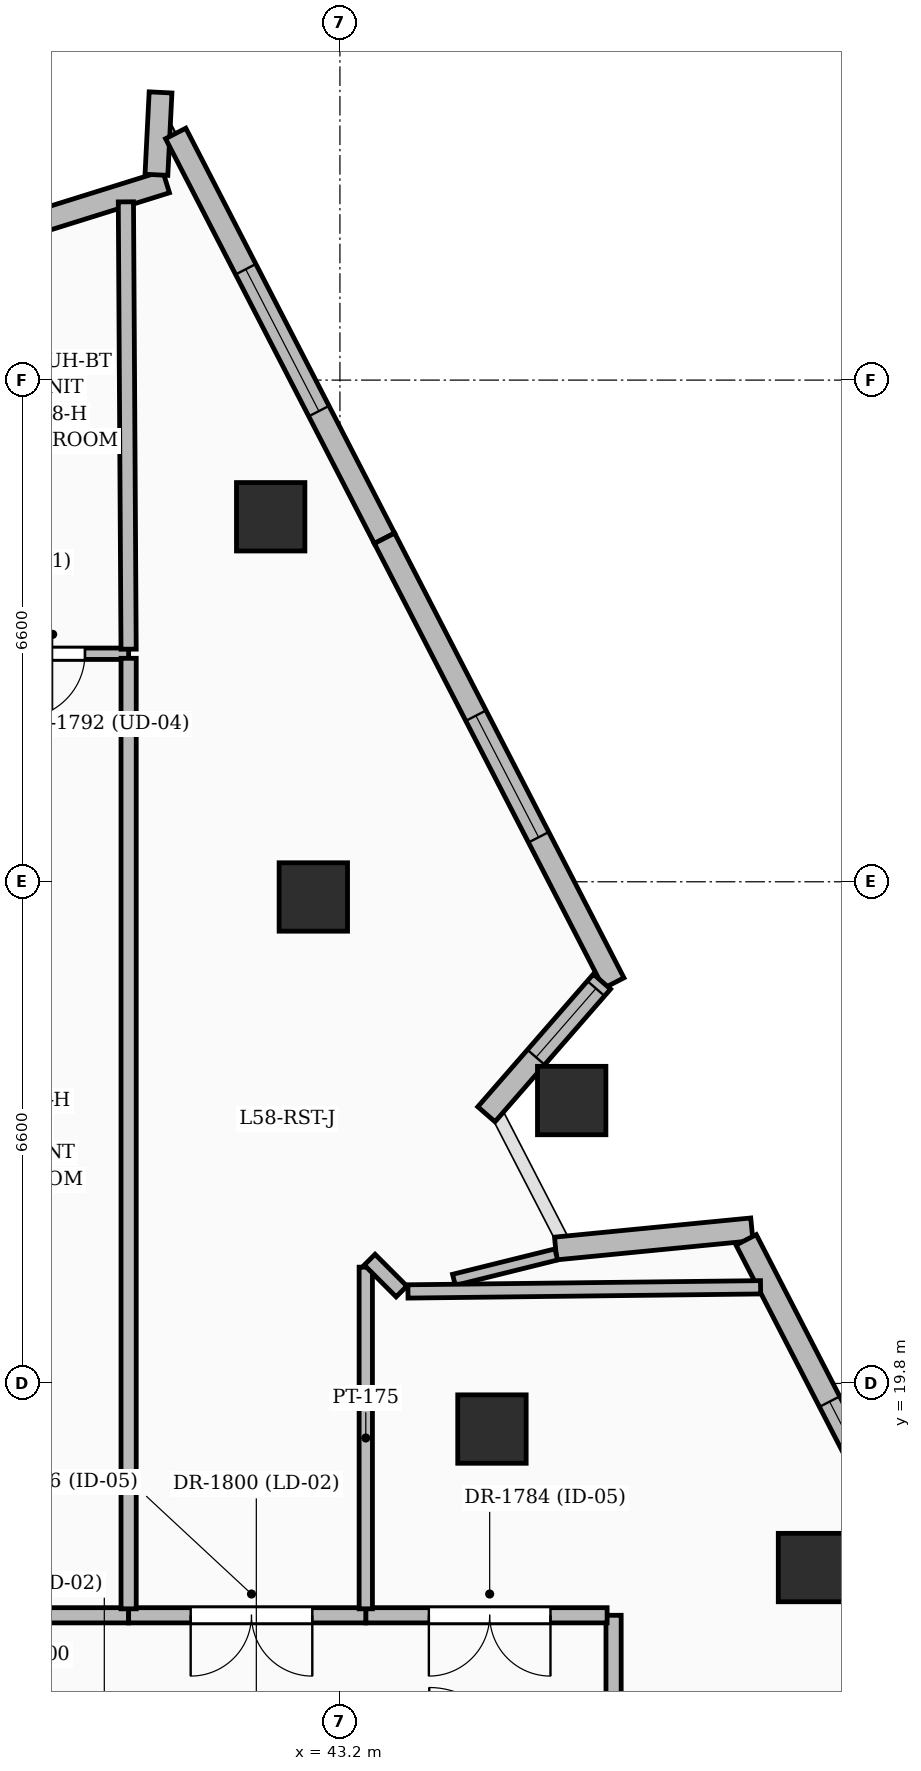
"""IFC4 building model, lengths in metres.
Left out: names, types, materials, properties, quantities, classifications, styles, units other than length and angle.
Written with IfcOpenShell. Run it as: python <this file> out.ifc"""

import sys

from ifc_helpers import new_model, si_unit, direction, frame, frame_2d, origin, origin_2d, place, context, subcontext, project, spatial, rectangle, extrude, element, fill, save


model = new_model("IFC4")
c1 = context("Model", 3, precision=1e-05, world=origin(), true_north=direction((0.0, 1.0)))
c2 = subcontext(c1, "Body", "Model", "MODEL_VIEW")
j1 = project(units=[si_unit("LENGTHUNIT", "METRE"), si_unit("PLANEANGLEUNIT", "RADIAN")], contexts=[c1])
p1 = place(None, origin())
s1 = spatial("IfcSite", under=j1, at=p1, CompositionType="ELEMENT")
p2 = place(p1, origin())
s2 = spatial("IfcBuilding", under=s1, at=p2, CompositionType="ELEMENT")
p3 = place(p2, frame((0.0, 0.0, 225.75)))
s3 = spatial("IfcBuildingStorey", under=s2, at=p3, CompositionType="ELEMENT", Elevation=225.75)
for number, where, z_axis, x_axis in (
    (1, (45.2, 19.2, 0.0), (0.0, 0.0, 1.0), (1.0, 0.0, 0.0)),
    (2, (42.85, 26.2, 0.0), (0.0, 0.0, 1.0), (1.0, 0.0, 0.0)),
    (3, (49.417, 17.378, 0.0), (0.0, 0.0, 1.0), (1.0, 0.0, 0.0)),
    (4, (46.249, 23.522, 0.0), (0.0, 0.0, 1.0), (1.0, 0.0, 0.0)),
    (5, (42.289, 31.202, 0.0), (0.0, 0.0, 1.0), (1.0, 0.0, 0.0)),
):
    element("IfcColumn", number, at=place(p3, frame(where, z_axis=z_axis, x_axis=x_axis)), inside=s3, PredefinedType="COLUMN", context=c2, shape_type="SweptSolid", body=[
        extrude(rectangle(XDim=0.9, YDim=0.9, at=origin_2d()), origin(), (0.0, 0.0, 1.0), 3.75),
    ])
p4 = place(p3, frame((38.886, 34.975, 0.0), z_axis=(0.0, 0.0, 1.0), x_axis=(0.954524975295, 0.298130963736, 0.0)))
e6 = element("IfcWall", 6, at=p4, inside=s3, PredefinedType="SOLIDWALL", context=c2, shape_type="SweptSolid", body=[
    extrude(rectangle(XDim=2.124, YDim=0.3, at=frame_2d((1.062, 0.0))), origin(), (0.0, 0.0, 1.0), 3.5),
])
p5 = place(p3, frame((40.786, 35.701, 0.0), z_axis=(0.0, 0.0, 1.0), x_axis=(0.05016199642, 0.998741094636, 0.0)))
e7 = element("IfcWall", 7, at=p5, inside=s3, PredefinedType="SOLIDWALL", context=c2, shape_type="SweptSolid", body=[
    extrude(rectangle(XDim=1.085, YDim=0.3, at=frame_2d((0.543, 0.0))), origin(), (0.0, 0.0, 1.0), 3.5),
])
p6 = place(p3, frame((41.039, 36.245, 0.0), z_axis=(0.0, 0.0, 1.0), x_axis=(0.458292150172, -0.888801611773, 0.0)))
e8 = element("IfcWall", 8, at=p6, inside=s3, PredefinedType="SOLIDWALL", context=c2, shape_type="SweptSolid", body=[
    extrude(rectangle(XDim=5.993, YDim=0.3, at=frame_2d((2.997, 0.0))), origin(), (0.0, 0.0, 1.0), 3.5),
])
p7 = place(p6, frame((2.01, 0.0, 0.55)))
e9 = element("IfcOpeningElement", 9, at=p7, cuts=e8, PredefinedType="OPENING", context=c2, shape_type="SweptSolid", body=[
    extrude(rectangle(XDim=2.1, YDim=2.4, at=frame_2d((1.05, 1.2))), frame((0.0, 0.16, 0.0), z_axis=(0.0, -1.0, 0.0), x_axis=(1.0, 0.0, 0.0)), (0.0, 0.0, 1.0), 0.32),
])
p8 = place(p3, frame((43.786, 30.918, 0.0), z_axis=(0.0, 0.0, 1.0), x_axis=(0.458349099599, -0.888772244671, 0.0)))
e10 = element("IfcWall", 10, at=p8, inside=s3, PredefinedType="SOLIDWALL", context=c2, shape_type="SweptSolid", body=[
    extrude(rectangle(XDim=6.583, YDim=0.3, at=frame_2d((3.292, 0.0))), origin(), (0.0, 0.0, 1.0), 3.5),
])
p9 = place(p8, frame((2.625, 0.0, 0.6)))
e11 = element("IfcOpeningElement", 11, at=p9, cuts=e10, PredefinedType="OPENING", context=c2, shape_type="SweptSolid", body=[
    extrude(rectangle(XDim=1.8, YDim=2.1, at=frame_2d((0.9, 1.05))), frame((0.0, 0.16, 0.0), z_axis=(0.0, -1.0, 0.0), x_axis=(1.0, 0.0, 0.0)), (0.0, 0.0, 1.0), 0.32),
])
p10 = place(p3, frame((46.647, 25.086, 0.0), z_axis=(0.0, 0.0, 1.0), x_axis=(-0.656860073981, -0.754012495394, 0.0)))
e12 = element("IfcWall", 12, at=p10, inside=s3, PredefinedType="SOLIDWALL", context=c2, shape_type="SweptSolid", body=[
    extrude(rectangle(XDim=2.314, YDim=0.3, at=frame_2d((1.157, 0.0))), origin(), (0.0, 0.0, 1.0), 2.825),
])
p11 = place(p10, frame((0.12, 0.0, 0.8)))
e13 = element("IfcOpeningElement", 13, at=p11, cuts=e12, PredefinedType="OPENING", context=c2, shape_type="SweptSolid", body=[
    extrude(rectangle(XDim=1.2, YDim=1.8, at=frame_2d((0.6, 0.9))), frame((0.0, 0.16, 0.0), z_axis=(0.0, -1.0, 0.0), x_axis=(1.0, 0.0, 0.0)), (0.0, 0.0, 1.0), 0.32),
])
p12 = place(p3, frame((46.038, 21.575, 0.0), z_axis=(0.0, 0.0, 1.0), x_axis=(0.995262869225, 0.097220476965, 0.0)))
e14 = element("IfcWall", 14, at=p12, inside=s3, PredefinedType="SOLIDWALL", context=c2, shape_type="SweptSolid", body=[
    extrude(rectangle(XDim=2.594, YDim=0.3, at=frame_2d((1.297, 0.0))), origin(), (0.0, 0.0, 1.0), 2.3),
])
p13 = place(p3, frame((48.544, 21.689, 0.0), z_axis=(0.0, 0.0, 1.0), x_axis=(0.458305242752, -0.888794860733, 0.0)))
e15 = element("IfcWall", 15, at=p13, inside=s3, PredefinedType="SOLIDWALL", context=c2, shape_type="SweptSolid", body=[
    extrude(rectangle(XDim=5.986, YDim=0.3, at=frame_2d((2.993, 0.0))), origin(), (0.0, 0.0, 1.0), 3.5),
])
p14 = place(p13, frame((2.395, 0.0, 0.8)))
e16 = element("IfcOpeningElement", 16, at=p14, cuts=e15, PredefinedType="OPENING", context=c2, shape_type="SweptSolid", body=[
    extrude(rectangle(XDim=1.2, YDim=1.8, at=frame_2d((0.6, 0.9))), frame((0.0, 0.16, 0.0), z_axis=(0.0, -1.0, 0.0), x_axis=(1.0, 0.0, 0.0)), (0.0, 0.0, 1.0), 0.32),
])
p15 = place(p3, frame((46.8, 15.05, 0.0), z_axis=(0.0, 0.0, 1.0), x_axis=(0.0, 1.0, 0.0)))
e17 = element("IfcWall", 17, at=p15, inside=s3, PredefinedType="PARTITIONING", context=c2, shape_type="SweptSolid", body=[
    extrude(rectangle(XDim=1.7, YDim=0.2, at=frame_2d((0.85, 0.0))), origin(), (0.0, 0.0, 1.0), 2.685),
])
p16 = place(p3, frame((46.715, 16.75, 0.0), z_axis=(0.0, 0.0, 1.0), x_axis=(-1.0, 0.0, 0.0)))
e18 = element("IfcWall", 18, at=p16, inside=s3, PredefinedType="PARTITIONING", context=c2, shape_type="SweptSolid", body=[
    extrude(rectangle(XDim=3.175, YDim=0.2, at=frame_2d((1.587, 0.0))), origin(), (0.0, 0.0, 1.0), 2.685),
])
p17 = place(p16, frame((0.745, 0.0, 0.0)))
e19 = element("IfcOpeningElement", 19, at=p17, cuts=e18, PredefinedType="OPENING", context=c2, shape_type="SweptSolid", body=[
    extrude(rectangle(XDim=1.6, YDim=2.3, at=frame_2d((0.8, 1.15))), frame((0.0, 0.11, 0.0), z_axis=(0.0, -1.0, 0.0), x_axis=(1.0, 0.0, 0.0)), (0.0, 0.0, 1.0), 0.22),
])
p18 = place(p3, frame((40.42, 16.75, 0.0), z_axis=(0.0, 0.0, 1.0), x_axis=(-1.0, 0.0, 0.0)))
e20 = element("IfcWall", 20, at=p18, inside=s3, PredefinedType="PARTITIONING", context=c2, shape_type="SweptSolid", body=[
    extrude(rectangle(XDim=3.12, YDim=0.2, at=frame_2d((1.56, 0.0))), origin(), (0.0, 0.0, 1.0), 3.5),
])
p19 = place(p3, frame((43.54, 16.75, 0.0), z_axis=(0.0, 0.0, 1.0), x_axis=(-1.0, 0.0, 0.0)))
e21 = element("IfcWall", 21, at=p19, inside=s3, PredefinedType="PARTITIONING", context=c2, shape_type="SweptSolid", body=[
    extrude(rectangle(XDim=3.12, YDim=0.2, at=frame_2d((1.56, 0.0))), origin(), (0.0, 0.0, 1.0), 3.5),
])
p20 = place(p19, frame((0.704, 0.0, 0.0)))
e22 = element("IfcOpeningElement", 22, at=p20, cuts=e21, PredefinedType="OPENING", context=c2, shape_type="SweptSolid", body=[
    extrude(rectangle(XDim=1.6, YDim=2.3, at=frame_2d((0.8, 1.15))), frame((0.0, 0.11, 0.0), z_axis=(0.0, -1.0, 0.0), x_axis=(1.0, 0.0, 0.0)), (0.0, 0.0, 1.0), 0.22),
])
p21 = place(p3, frame((43.54, 21.33, 0.0), z_axis=(0.0, 0.0, 1.0), x_axis=(0.0, -1.0, 0.0)))
e23 = element("IfcWall", 23, at=p21, inside=s3, PredefinedType="PARTITIONING", context=c2, shape_type="SweptSolid", body=[
    extrude(rectangle(XDim=4.495, YDim=0.175, at=frame_2d((2.248, 0.0))), origin(), (0.0, 0.0, 1.0), 3.5),
])
p22 = place(p3, frame((44.01, 21.01, 0.0), z_axis=(0.0, 0.0, 1.0), x_axis=(-0.707106781187, 0.707106781187, 0.0)))
e24 = element("IfcWall", 24, at=p22, inside=s3, PredefinedType="PARTITIONING", context=c2, shape_type="SweptSolid", body=[
    extrude(rectangle(XDim=0.592, YDim=0.2, at=frame_2d((0.296, 0.0))), origin(), (0.0, 0.0, 1.0), 3.5),
])
p23 = place(p3, frame((40.42, 29.4, 0.0), z_axis=(0.0, 0.0, 1.0), x_axis=(-1.0, 0.0, 0.0)))
e25 = element("IfcWall", 25, at=p23, inside=s3, PredefinedType="PARTITIONING", context=c2, shape_type="SweptSolid", body=[
    extrude(rectangle(XDim=1.89, YDim=0.15, at=frame_2d((0.945, 0.0))), origin(), (0.0, 0.0, 1.0), 3.5),
])
p24 = place(p23, frame((0.574, 0.0, 0.0)))
e26 = element("IfcOpeningElement", 26, at=p24, cuts=e25, PredefinedType="OPENING", context=c2, shape_type="SweptSolid", body=[
    extrude(rectangle(XDim=0.85, YDim=2.1, at=frame_2d((0.425, 1.05))), frame((0.0, 0.085, 0.0), z_axis=(0.0, -1.0, 0.0), x_axis=(1.0, 0.0, 0.0)), (0.0, 0.0, 1.0), 0.17),
])
p25 = place(p3, frame((40.42, 16.835, 0.0), z_axis=(0.0, 0.0, 1.0), x_axis=(0.0, 1.0, 0.0)))
e27 = element("IfcWall", 27, at=p25, inside=s3, PredefinedType="PARTITIONING", context=c2, shape_type="SweptSolid", body=[
    extrude(rectangle(XDim=12.505, YDim=0.2, at=frame_2d((6.252, 0.0))), origin(), (0.0, 0.0, 1.0), 2.685),
])
p26 = place(p3, frame((40.42, 29.46, 0.0), z_axis=(0.0, 0.0, 1.0), x_axis=(-0.006056723586, 0.999981657881, 0.0)))
e28 = element("IfcWall", 28, at=p26, inside=s3, PredefinedType="PARTITIONING", context=c2, shape_type="SweptSolid", body=[
    extrude(rectangle(XDim=5.885, YDim=0.2, at=frame_2d((2.942, 0.0))), origin(), (0.0, 0.0, 1.0), 2.82),
])
p27 = place(p3, frame((44.7, 21.163, 0.0), z_axis=(0.0, 0.0, 1.0), x_axis=(0.970565605562, 0.240836885255, 0.0)))
e29 = element("IfcWall", 29, at=p27, inside=s3, PredefinedType="PARTITIONING", context=c2, shape_type="SweptSolid", body=[
    extrude(rectangle(XDim=1.387, YDim=0.15, at=frame_2d((0.693, 0.0))), origin(), (0.0, 0.0, 1.0), 1.27),
])
p28 = place(p3, frame((48.734, 21.065, 0.0), z_axis=(0.0, 0.0, 1.0), x_axis=(-0.999931137632, -0.011735416225, 0.0)))
e30 = element("IfcWall", 30, at=p28, inside=s3, PredefinedType="PARTITIONING", context=c2, shape_type="SweptSolid", body=[
    extrude(rectangle(XDim=4.639, YDim=0.175, at=frame_2d((2.32, 0.0))), origin(), (0.0, 0.0, 1.0), 1.27),
])
p29 = place(p7, origin())
e31 = element("IfcWindow", 31, at=p29, inside=s3, PartitioningType="SINGLE_PANEL", PredefinedType="WINDOW", context=c2, shape_type="SweptSolid", body=[
    extrude(rectangle(XDim=2.1, YDim=2.4, at=frame_2d((1.05, 1.2))), frame((0.0, 0.03, 0.0), z_axis=(0.0, -1.0, 0.0), x_axis=(1.0, 0.0, 0.0)), (0.0, 0.0, 1.0), 0.06),
])
fill(e9, e31)
p30 = place(p9, origin())
e32 = element("IfcWindow", 32, at=p30, inside=s3, PartitioningType="SINGLE_PANEL", PredefinedType="WINDOW", context=c2, shape_type="SweptSolid", body=[
    extrude(rectangle(XDim=1.8, YDim=2.1, at=frame_2d((0.9, 1.05))), frame((0.0, 0.03, 0.0), z_axis=(0.0, -1.0, 0.0), x_axis=(1.0, 0.0, 0.0)), (0.0, 0.0, 1.0), 0.06),
])
fill(e11, e32)
p31 = place(p11, origin())
e33 = element("IfcWindow", 33, at=p31, inside=s3, PartitioningType="SINGLE_PANEL", PredefinedType="WINDOW", context=c2, shape_type="SweptSolid", body=[
    extrude(rectangle(XDim=1.2, YDim=1.8, at=frame_2d((0.6, 0.9))), frame((0.0, 0.03, 0.0), z_axis=(0.0, -1.0, 0.0), x_axis=(1.0, 0.0, 0.0)), (0.0, 0.0, 1.0), 0.06),
])
fill(e13, e33)
p32 = place(p14, origin())
e34 = element("IfcWindow", 34, at=p32, inside=s3, PartitioningType="SINGLE_PANEL", PredefinedType="WINDOW", context=c2, shape_type="SweptSolid", body=[
    extrude(rectangle(XDim=1.2, YDim=1.8, at=frame_2d((0.6, 0.9))), frame((0.0, 0.03, 0.0), z_axis=(0.0, -1.0, 0.0), x_axis=(1.0, 0.0, 0.0)), (0.0, 0.0, 1.0), 0.06),
])
fill(e16, e34)
p33 = place(p17, origin())
e35 = element("IfcDoor", 35, at=p33, inside=s3, OperationType="DOUBLE_DOOR_SINGLE_SWING", PredefinedType="DOOR", context=c2, shape_type="SweptSolid", body=[
    extrude(rectangle(XDim=1.6, YDim=2.3, at=frame_2d((0.8, 1.15))), frame((0.0, 0.025, 0.0), z_axis=(0.0, -1.0, 0.0), x_axis=(1.0, 0.0, 0.0)), (0.0, 0.0, 1.0), 0.05),
])
fill(e19, e35)
p34 = place(p20, origin())
e36 = element("IfcDoor", 36, at=p34, inside=s3, OperationType="DOUBLE_DOOR_SINGLE_SWING", PredefinedType="DOOR", context=c2, shape_type="SweptSolid", body=[
    extrude(rectangle(XDim=1.6, YDim=2.3, at=frame_2d((0.8, 1.15))), frame((0.0, 0.025, 0.0), z_axis=(0.0, -1.0, 0.0), x_axis=(1.0, 0.0, 0.0)), (0.0, 0.0, 1.0), 0.05),
])
fill(e22, e36)
p35 = place(p24, origin())
e37 = element("IfcDoor", 37, at=p35, inside=s3, OperationType="SINGLE_SWING_RIGHT", PredefinedType="DOOR", context=c2, shape_type="SweptSolid", body=[
    extrude(rectangle(XDim=0.85, YDim=2.1, at=frame_2d((0.425, 1.05))), frame((0.0, 0.025, 0.0), z_axis=(0.0, -1.0, 0.0), x_axis=(1.0, 0.0, 0.0)), (0.0, 0.0, 1.0), 0.05),
])
fill(e26, e37)
save(model, sys.argv[1])
